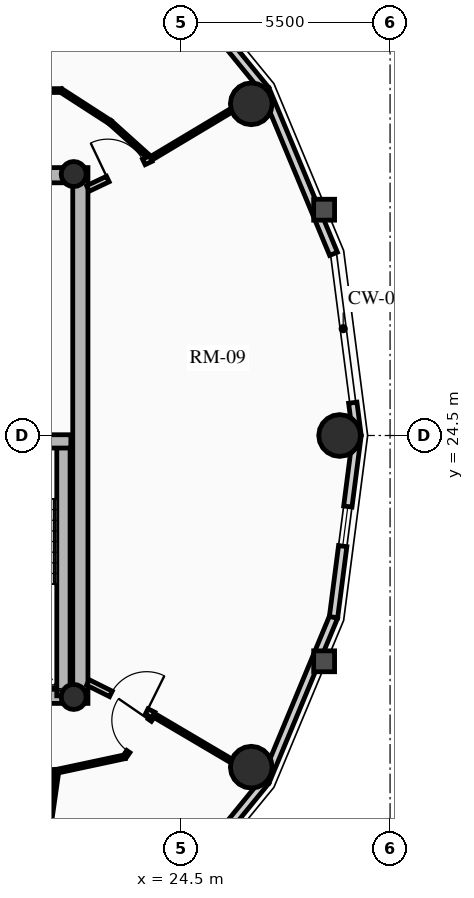
"""IFC4 building model, lengths in metres.
Left out: names, types, materials, properties, quantities, classifications, styles, units other than length and angle.
Written with IfcOpenShell. Run it as: python <this file> out.ifc"""

import sys

from ifc_helpers import new_model, si_unit, direction, frame, frame_2d, origin, origin_2d, place, context, subcontext, project, spatial, rectangle, circle, hollow_circle, extrude, source, transform, mapped, element, fill, save


model = new_model("IFC4")
c1 = context("Model", 3, precision=1e-05, world=origin(), true_north=direction((0.0, 1.0)))
c2 = subcontext(c1, "Body", "Model", "MODEL_VIEW")
j1 = project(units=[si_unit("LENGTHUNIT", "METRE"), si_unit("PLANEANGLEUNIT", "RADIAN")], contexts=[c1])
p1 = place(None, origin())
s1 = spatial("IfcSite", under=j1, at=p1, CompositionType="ELEMENT")
p2 = place(p1, origin())
s2 = spatial("IfcBuilding", under=s1, at=p2, CompositionType="ELEMENT")
p3 = place(p2, frame((0.0, 0.0, 199.57)))
s3 = spatial("IfcBuildingStorey", under=s2, at=p3, CompositionType="ELEMENT", Elevation=199.57)
p4 = place(p3, frame((21.85, 17.45, 0.0), z_axis=(0.0, 0.0, 1.0), x_axis=(0.0, 1.0, 0.0)))
e1 = element("IfcWall", 1, at=p4, inside=s3, PredefinedType="SHEAR", context=c2, shape_type="SweptSolid", body=[
    extrude(rectangle(XDim=14.1, YDim=0.4, at=frame_2d((7.05, 0.0))), origin(), (0.0, 0.0, 1.0), 2.91),
])
p5 = place(p3, frame((11.15, 17.65, 0.0), z_axis=(0.0, 0.0, 1.0), x_axis=(1.0, 0.0, 0.0)))
e2 = element("IfcWall", 2, at=p5, inside=s3, PredefinedType="SHEAR", context=c2, shape_type="SweptSolid", body=[
    extrude(rectangle(XDim=10.7, YDim=0.4, at=frame_2d((5.35, 0.0))), origin(), (0.0, 0.0, 1.0), 2.91),
])
m1 = source(origin(), c2, "Body", "SweptSolid", [
    extrude(rectangle(XDim=1.5, YDim=2.02, at=frame_2d((0.75, 1.01))), frame((0.0, 0.21, 0.0), z_axis=(0.0, -1.0, 0.0), x_axis=(1.0, 0.0, 0.0)), (0.0, 0.0, 1.0), 0.42),
])
p6 = place(p5, frame((5.45, 0.0, 0.0)))
e3 = element("IfcOpeningElement", 3, at=p6, cuts=e2, PredefinedType="OPENING", context=c2, shape_type="MappedRepresentation", body=[
    mapped(m1, transform((0.0, 0.0, 0.0), x_axis=(1.0, 0.0, 0.0), y_axis=(0.0, 1.0, 0.0), z_axis=(0.0, 0.0, 1.0), scale=1.0)),
])
p7 = place(p3, frame((11.15, 31.35, 0.0), z_axis=(0.0, 0.0, 1.0), x_axis=(1.0, 0.0, 0.0)))
e4 = element("IfcWall", 4, at=p7, inside=s3, PredefinedType="SHEAR", context=c2, shape_type="SweptSolid", body=[
    extrude(rectangle(XDim=10.7, YDim=0.4, at=frame_2d((5.35, 0.0))), origin(), (0.0, 0.0, 1.0), 2.91),
])
p8 = place(p7, frame((4.6, 0.0, 0.0)))
e5 = element("IfcOpeningElement", 5, at=p8, cuts=e4, PredefinedType="OPENING", context=c2, shape_type="MappedRepresentation", body=[
    mapped(m1, transform((0.0, 0.0, 0.0), x_axis=(1.0, 0.0, 0.0), y_axis=(0.0, 1.0, 0.0), z_axis=(0.0, 0.0, 1.0), scale=1.0)),
])
p9 = place(p3, frame((21.405, 17.65, 0.0), z_axis=(0.0, 0.0, 1.0), x_axis=(0.0, 1.0, 0.0)))
e6 = element("IfcWall", 6, at=p9, inside=s3, PredefinedType="SHEAR", context=c2, shape_type="SweptSolid", body=[
    extrude(rectangle(XDim=6.695, YDim=0.35, at=frame_2d((3.348, 0.0))), origin(), (0.0, 0.0, 1.0), 2.91),
])
p10 = place(p3, frame((18.315, 24.345, 0.0), z_axis=(0.0, 0.0, 1.0), x_axis=(1.0, 0.0, 0.0)))
e7 = element("IfcWall", 7, at=p10, inside=s3, PredefinedType="SHEAR", context=c2, shape_type="SweptSolid", body=[
    extrude(rectangle(XDim=3.285, YDim=0.35, at=frame_2d((1.643, 0.0))), origin(), (0.0, 0.0, 1.0), 2.91),
])
for number, where, z_axis, x_axis in (
    (8, (21.675, 17.62, 0.0), (0.0, 0.0, 1.0), (1.0, 0.0, 0.0)),
    (9, (21.675, 31.38, 0.0), (0.0, 0.0, 1.0), (1.0, 0.0, 0.0)),
):
    element("IfcColumn", number, at=place(p3, frame(where, z_axis=z_axis, x_axis=x_axis)), inside=s3, PredefinedType="COLUMN", context=c2, shape_type="SweptSolid", body=[
        extrude(hollow_circle(Radius=0.33, WallThickness=0.025, at=origin_2d()), origin(), (0.0, 0.0, 1.0), 2.91),
    ])
for number, where, z_axis, x_axis in (
    (10, (28.672, 24.5, 0.0), (0.0, 0.0, 1.0), (1.0, 0.0, 0.0)),
    (11, (26.347, 33.229, 0.0), (0.0, 0.0, 1.0), (1.0, 0.0, 0.0)),
    (12, (26.347, 15.771, 0.0), (0.0, 0.0, 1.0), (1.0, 0.0, 0.0)),
):
    element("IfcColumn", number, at=place(p3, frame(where, z_axis=z_axis, x_axis=x_axis)), inside=s3, PredefinedType="USERDEFINED", context=c2, shape_type="SweptSolid", body=[
        extrude(circle(Radius=0.55, at=origin_2d()), origin(), (0.0, 0.0, 1.0), 2.91),
    ])
p11 = place(p3, frame((29.018, 25.363, 0.0), z_axis=(0.0, 0.0, 1.0), x_axis=(0.128247365719, -0.991742211054, 0.0)))
e13 = element("IfcWall", 13, at=p11, inside=s3, PredefinedType="SOLIDWALL", context=c2, shape_type="SweptSolid", body=[
    extrude(rectangle(XDim=0.87, YDim=0.22, at=frame_2d((0.435, 0.0))), origin(), (0.0, 0.0, 1.0), 2.322),
])
p12 = place(p3, frame((26.718, 33.593, 0.0), z_axis=(0.0, 0.0, 1.0), x_axis=(0.384036305194, -0.923317993052, 0.0)))
e14 = element("IfcWall", 14, at=p12, inside=s3, PredefinedType="SOLIDWALL", context=c2, shape_type="SweptSolid", body=[
    extrude(rectangle(XDim=4.671, YDim=0.22, at=frame_2d((2.335, 0.0))), origin(), (0.0, 0.0, 1.0), 2.322),
])
p13 = place(p3, frame((23.924, 37.015, 0.0), z_axis=(0.0, 0.0, 1.0), x_axis=(0.632467166636, -0.774587169483, 0.0)))
e15 = element("IfcWall", 15, at=p13, inside=s3, PredefinedType="SOLIDWALL", context=c2, shape_type="SweptSolid", body=[
    extrude(rectangle(XDim=4.418, YDim=0.22, at=frame_2d((2.209, 0.0))), origin(), (0.0, 0.0, 1.0), 2.322),
])
m2 = source(origin(), c2, "Body", "SweptSolid", [
    extrude(rectangle(XDim=1.05, YDim=1.3, at=frame_2d((0.525, 0.65))), frame((0.0, 0.12, 0.0), z_axis=(0.0, -1.0, 0.0), x_axis=(1.0, 0.0, 0.0)), (0.0, 0.0, 1.0), 0.24),
])
p14 = place(p13, frame((1.684, 0.0, 0.65)))
e16 = element("IfcOpeningElement", 16, at=p14, cuts=e15, PredefinedType="OPENING", context=c2, shape_type="MappedRepresentation", body=[
    mapped(m2, transform((0.0, 0.0, 0.0), x_axis=(1.0, 0.0, 0.0), y_axis=(0.0, 1.0, 0.0), z_axis=(0.0, 0.0, 1.0), scale=1.0)),
])
p15 = place(p3, frame((26.718, 15.407, 0.0), z_axis=(0.0, 0.0, 1.0), x_axis=(-0.632467166636, -0.774587169483, 0.0)))
e17 = element("IfcWall", 17, at=p15, inside=s3, PredefinedType="SOLIDWALL", context=c2, shape_type="SweptSolid", body=[
    extrude(rectangle(XDim=4.418, YDim=0.22, at=frame_2d((2.209, 0.0))), origin(), (0.0, 0.0, 1.0), 2.322),
])
p16 = place(p15, frame((1.684, 0.0, 0.65)))
e18 = element("IfcOpeningElement", 18, at=p16, cuts=e17, PredefinedType="OPENING", context=c2, shape_type="MappedRepresentation", body=[
    mapped(m2, transform((0.0, 0.0, 0.0), x_axis=(1.0, 0.0, 0.0), y_axis=(0.0, 1.0, 0.0), z_axis=(0.0, 0.0, 1.0), scale=1.0)),
])
p17 = place(p3, frame((28.512, 19.719, 0.0), z_axis=(0.0, 0.0, 1.0), x_axis=(-0.384036305194, -0.923317993052, 0.0)))
e19 = element("IfcWall", 19, at=p17, inside=s3, PredefinedType="SOLIDWALL", context=c2, shape_type="SweptSolid", body=[
    extrude(rectangle(XDim=4.671, YDim=0.22, at=frame_2d((2.335, 0.0))), origin(), (0.0, 0.0, 1.0), 2.322),
])
p18 = place(p3, frame((29.13, 24.5, 0.0), z_axis=(0.0, 0.0, 1.0), x_axis=(-0.128241318541, -0.991742993027, 0.0)))
e20 = element("IfcWall", 20, at=p18, inside=s3, PredefinedType="SOLIDWALL", context=c2, shape_type="SweptSolid", body=[
    extrude(rectangle(XDim=4.82, YDim=0.22, at=frame_2d((2.41, 0.0))), origin(), (0.0, 0.0, 1.0), 2.322),
])
p19 = place(p18, frame((1.885, 0.0, 0.65)))
e21 = element("IfcOpeningElement", 21, at=p19, cuts=e20, PredefinedType="OPENING", context=c2, shape_type="MappedRepresentation", body=[
    mapped(m2, transform((0.0, 0.0, 0.0), x_axis=(1.0, 0.0, 0.0), y_axis=(0.0, 1.0, 0.0), z_axis=(0.0, 0.0, 1.0), scale=1.0)),
])
p20 = place(p3, frame((23.701, 31.786, 0.0), z_axis=(0.0, 0.0, 1.0), x_axis=(-0.743742806382, 0.668465883913, 0.0)))
e22 = element("IfcWall", 22, at=p20, inside=s3, PredefinedType="MOVABLE", context=c2, shape_type="SweptSolid", body=[
    extrude(rectangle(XDim=1.434, YDim=0.1, at=frame_2d((0.717, 0.0))), origin(), (0.0, 0.0, 1.0), 2.322),
])
p21 = place(p3, frame((22.635, 32.744, 0.0), z_axis=(0.0, 0.0, 1.0), x_axis=(-0.840119270642, 0.542401706391, 0.0)))
e23 = element("IfcWall", 23, at=p21, inside=s3, PredefinedType="MOVABLE", context=c2, shape_type="SweptSolid", body=[
    extrude(rectangle(XDim=1.538, YDim=0.1, at=frame_2d((0.769, 0.0))), origin(), (0.0, 0.0, 1.0), 2.255),
])
p22 = place(p3, frame((21.344, 33.578, 0.0), z_axis=(0.0, 0.0, 1.0), x_axis=(-0.999984243152, -0.005613684, 0.0)))
e24 = element("IfcWall", 24, at=p22, inside=s3, PredefinedType="MOVABLE", context=c2, shape_type="SweptSolid", body=[
    extrude(rectangle(XDim=3.262, YDim=0.1, at=frame_2d((1.631, 0.0))), origin(), (0.0, 0.0, 1.0), 2.322),
])
m3 = source(origin(), c2, "Body", "SweptSolid", [
    extrude(rectangle(XDim=1.05, YDim=2.015, at=frame_2d((0.525, 1.007))), frame((0.0, 0.06, 0.0), z_axis=(0.0, -1.0, 0.0), x_axis=(1.0, 0.0, 0.0)), (0.0, 0.0, 1.0), 0.12),
])
p23 = place(p22, frame((1.599, 0.0, 0.0)))
e25 = element("IfcOpeningElement", 25, at=p23, cuts=e24, PredefinedType="OPENING", context=c2, shape_type="MappedRepresentation", body=[
    mapped(m3, transform((0.0, 0.0, 0.0), x_axis=(1.0, 0.0, 0.0), y_axis=(0.0, 1.0, 0.0), z_axis=(0.0, 0.0, 1.0), scale=1.0)),
])
p24 = place(p3, frame((14.845, 15.441, 0.0), z_axis=(0.0, 0.0, 1.0), x_axis=(0.99938794868, 0.034981824334, 0.0)))
e26 = element("IfcWall", 26, at=p24, inside=s3, PredefinedType="MOVABLE", context=c2, shape_type="SweptSolid", body=[
    extrude(rectangle(XDim=6.393, YDim=0.1, at=frame_2d((3.196, 0.0))), origin(), (0.0, 0.0, 1.0), 2.255),
])
p25 = place(p3, frame((21.234, 15.664, 0.0), z_axis=(0.0, 0.0, 1.0), x_axis=(0.977931581182, 0.208925399431, 0.0)))
e27 = element("IfcWall", 27, at=p25, inside=s3, PredefinedType="MOVABLE", context=c2, shape_type="SweptSolid", body=[
    extrude(rectangle(XDim=1.823, YDim=0.1, at=frame_2d((0.912, 0.0))), origin(), (0.0, 0.0, 1.0), 2.255),
])
p26 = place(p3, frame((23.017, 16.045, 0.0), z_axis=(0.0, 0.0, 1.0), x_axis=(0.566660656138, 0.823951273308, 0.0)))
e28 = element("IfcWall", 28, at=p26, inside=s3, PredefinedType="MOVABLE", context=c2, shape_type="SweptSolid", body=[
    extrude(rectangle(XDim=1.336, YDim=0.1, at=frame_2d((0.668, 0.0))), origin(), (0.0, 0.0, 1.0), 2.322),
])
m4 = source(origin(), c2, "Body", "SweptSolid", [
    extrude(rectangle(XDim=1.0, YDim=2.015, at=frame_2d((0.5, 1.007))), frame((0.0, 0.06, 0.0), z_axis=(0.0, -1.0, 0.0), x_axis=(1.0, 0.0, 0.0)), (0.0, 0.0, 1.0), 0.12),
])
p27 = place(p26, frame((0.168, 0.0, 0.0)))
e29 = element("IfcOpeningElement", 29, at=p27, cuts=e28, PredefinedType="OPENING", context=c2, shape_type="MappedRepresentation", body=[
    mapped(m4, transform((0.0, 0.0, 0.0), x_axis=(1.0, 0.0, 0.0), y_axis=(0.0, 1.0, 0.0), z_axis=(0.0, 0.0, 1.0), scale=1.0)),
])
p28 = place(p3, frame((23.701, 31.786, 0.0), z_axis=(0.0, 0.0, 1.0), x_axis=(0.858059206709, 0.513550774298, 0.0)))
e30 = element("IfcWall", 30, at=p28, inside=s3, PredefinedType="MOVABLE", context=c2, shape_type="SweptSolid", body=[
    extrude(rectangle(XDim=3.497, YDim=0.1, at=frame_2d((1.748, 0.0))), origin(), (0.0, 0.0, 1.0), 2.322),
])
p29 = place(p3, frame((21.234, 15.664, 0.0), z_axis=(0.0, 0.0, 1.0), x_axis=(-0.141467563045, -0.989942891588, 0.0)))
e31 = element("IfcWall", 31, at=p29, inside=s3, PredefinedType="MOVABLE", context=c2, shape_type="SweptSolid", body=[
    extrude(rectangle(XDim=5.918, YDim=0.1, at=frame_2d((2.959, 0.0))), origin(), (0.0, 0.0, 1.0), 2.322),
])
p30 = place(p3, frame((23.774, 17.146, 0.0), z_axis=(0.0, 0.0, 1.0), x_axis=(0.861296601099, -0.508102514198, 0.0)))
e32 = element("IfcWall", 32, at=p30, inside=s3, PredefinedType="MOVABLE", context=c2, shape_type="SweptSolid", body=[
    extrude(rectangle(XDim=3.399, YDim=0.1, at=frame_2d((1.7, 0.0))), origin(), (0.0, 0.0, 1.0), 2.322),
])
p31 = place(p3, frame((22.05, 31.0, 0.0), z_axis=(0.0, 0.0, 1.0), x_axis=(0.903013459407, 0.429612257891, 0.0)))
e33 = element("IfcWall", 33, at=p31, inside=s3, PredefinedType="PARTITIONING", context=c2, shape_type="SweptSolid", body=[
    extrude(rectangle(XDim=1.829, YDim=0.16, at=frame_2d((0.914, 0.0))), origin(), (0.0, 0.0, 1.0), 2.255),
])
m5 = source(origin(), c2, "Body", "SweptSolid", [
    extrude(rectangle(XDim=1.05, YDim=2.015, at=frame_2d((0.525, 1.007))), frame((0.0, 0.09, 0.0), z_axis=(0.0, -1.0, 0.0), x_axis=(1.0, 0.0, 0.0)), (0.0, 0.0, 1.0), 0.18),
])
p32 = place(p31, frame((0.579, 0.0, 0.0)))
e34 = element("IfcOpeningElement", 34, at=p32, cuts=e33, PredefinedType="OPENING", context=c2, shape_type="MappedRepresentation", body=[
    mapped(m5, transform((0.0, 0.0, 0.0), x_axis=(1.0, 0.0, 0.0), y_axis=(0.0, 1.0, 0.0), z_axis=(0.0, 0.0, 1.0), scale=1.0)),
])
p33 = place(p3, frame((22.05, 18.0, 0.0), z_axis=(0.0, 0.0, 1.0), x_axis=(0.896045848613, -0.443961526692, 0.0)))
e35 = element("IfcWall", 35, at=p33, inside=s3, PredefinedType="PARTITIONING", context=c2, shape_type="SweptSolid", body=[
    extrude(rectangle(XDim=1.924, YDim=0.16, at=frame_2d((0.962, 0.0))), origin(), (0.0, 0.0, 1.0), 2.255),
])
p34 = place(p33, frame((0.674, 0.0, 0.0)))
e36 = element("IfcOpeningElement", 36, at=p34, cuts=e35, PredefinedType="OPENING", context=c2, shape_type="MappedRepresentation", body=[
    mapped(m5, transform((0.0, 0.0, 0.0), x_axis=(1.0, 0.0, 0.0), y_axis=(0.0, 1.0, 0.0), z_axis=(0.0, 0.0, 1.0), scale=1.0)),
])
m6 = source(origin(), c2, "Body", "SweptSolid", [
    extrude(rectangle(XDim=1.05, YDim=1.3, at=frame_2d((0.525, 0.65))), frame((0.0, 0.03, 0.0), z_axis=(0.0, -1.0, 0.0), x_axis=(1.0, 0.0, 0.0)), (0.0, 0.0, 1.0), 0.06),
])
p35 = place(p19, origin())
e37 = element("IfcWindow", 37, at=p35, inside=s3, PartitioningType="SINGLE_PANEL", PredefinedType="WINDOW", context=c2, shape_type="MappedRepresentation", body=[
    mapped(m6, transform((0.0, 0.0, 0.0), x_axis=(1.0, 0.0, 0.0), y_axis=(0.0, 1.0, 0.0), z_axis=(0.0, 0.0, 1.0), scale=1.0)),
])
fill(e21, e37)
m7 = source(origin(), c2, "Body", "SweptSolid", [
    extrude(rectangle(XDim=1.05, YDim=2.015, at=frame_2d((0.525, 1.007))), frame((0.0, 0.025, 0.0), z_axis=(0.0, -1.0, 0.0), x_axis=(1.0, 0.0, 0.0)), (0.0, 0.0, 1.0), 0.05),
])
p36 = place(p32, origin())
e38 = element("IfcDoor", 38, at=p36, inside=s3, OperationType="SINGLE_SWING_LEFT", PredefinedType="DOOR", context=c2, shape_type="MappedRepresentation", body=[
    mapped(m7, transform((0.0, 0.0, 0.0), x_axis=(1.0, 0.0, 0.0), y_axis=(0.0, 1.0, 0.0), z_axis=(0.0, 0.0, 1.0), scale=1.0)),
])
fill(e34, e38)
p37 = place(p34, origin())
e39 = element("IfcDoor", 39, at=p37, inside=s3, OperationType="SINGLE_SWING_RIGHT", PredefinedType="DOOR", context=c2, shape_type="MappedRepresentation", body=[
    mapped(m7, transform((0.0, 0.0, 0.0), x_axis=(1.0, 0.0, 0.0), y_axis=(0.0, 1.0, 0.0), z_axis=(0.0, 0.0, 1.0), scale=1.0)),
])
fill(e36, e39)
m8 = source(origin(), c2, "Body", "SweptSolid", [
    extrude(rectangle(XDim=1.0, YDim=2.015, at=frame_2d((0.5, 1.007))), frame((0.0, 0.025, 0.0), z_axis=(0.0, -1.0, 0.0), x_axis=(1.0, 0.0, 0.0)), (0.0, 0.0, 1.0), 0.05),
])
p38 = place(p27, origin())
e40 = element("IfcDoor", 40, at=p38, inside=s3, OperationType="SINGLE_SWING_RIGHT", PredefinedType="DOOR", context=c2, shape_type="MappedRepresentation", body=[
    mapped(m8, transform((0.0, 0.0, 0.0), x_axis=(1.0, 0.0, 0.0), y_axis=(0.0, 1.0, 0.0), z_axis=(0.0, 0.0, 1.0), scale=1.0)),
])
fill(e29, e40)
save(model, sys.argv[1])
